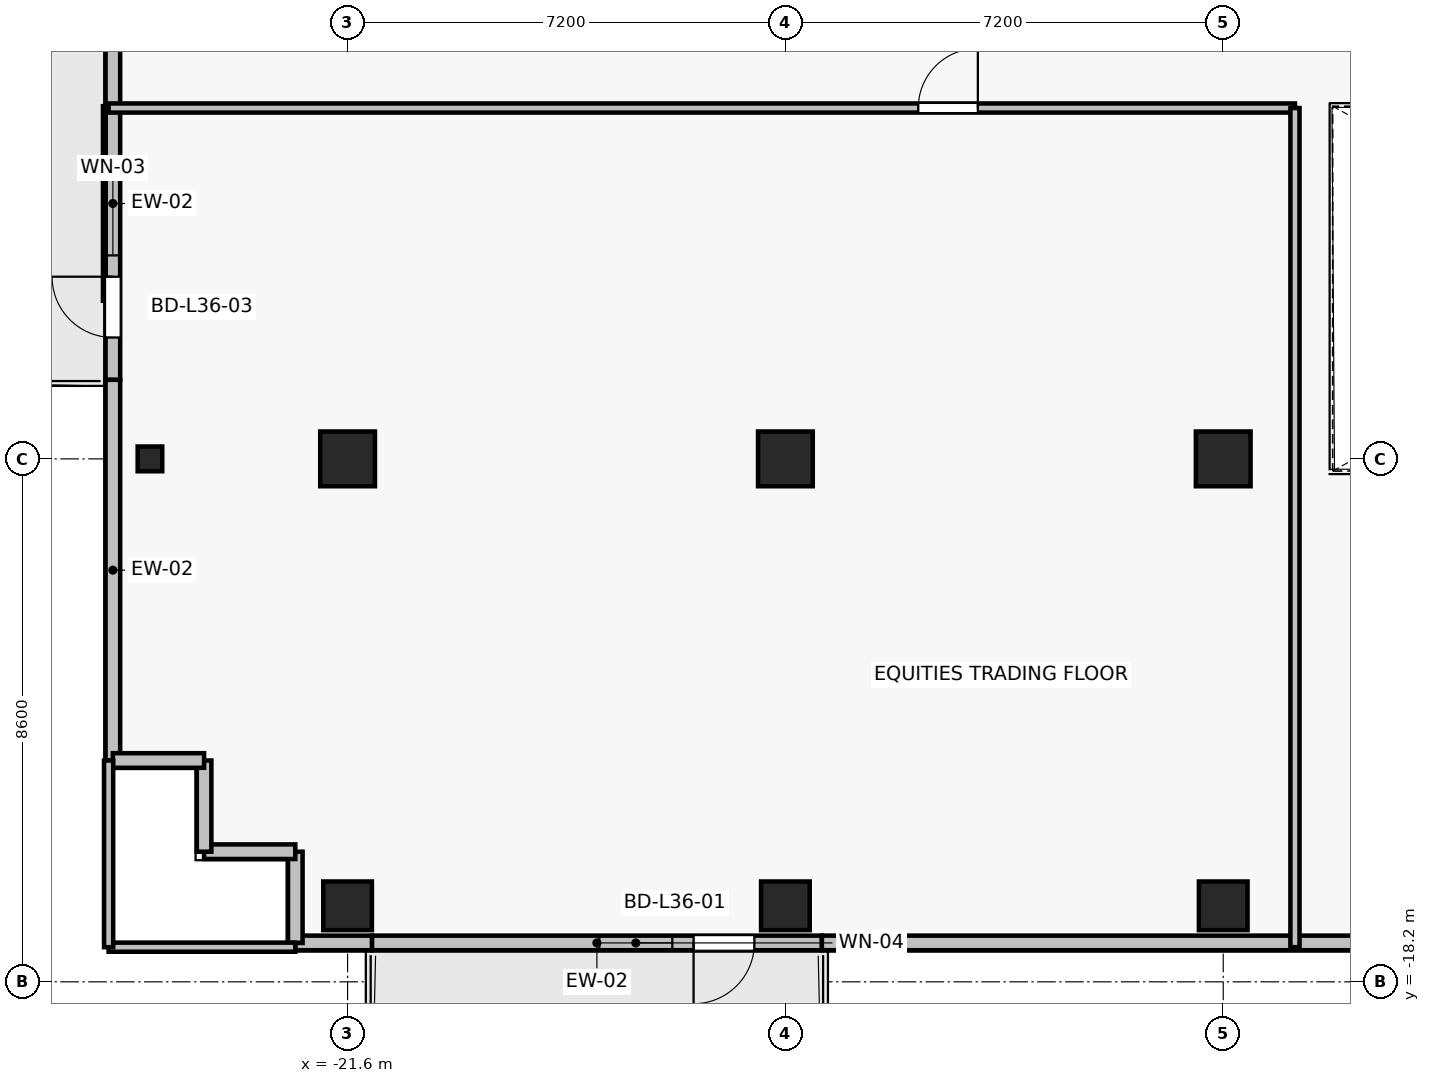
"""IFC4 building model, lengths in metres.
Left out: names, types, materials, properties, quantities, classifications, styles, units other than length and angle.
Written with IfcOpenShell. Run it as: python <this file> out.ifc"""

import sys

from ifc_helpers import new_model, si_unit, direction, frame, frame_2d, origin, origin_2d, place, context, subcontext, project, spatial, rectangle, i_section, extrude, source, transform, mapped, element, fill, save


model = new_model("IFC4")
c1 = context("Model", 3, precision=1e-05, world=origin(), true_north=direction((0.0, 1.0)))
c2 = subcontext(c1, "Body", "Model", "MODEL_VIEW")
j1 = project(units=[si_unit("LENGTHUNIT", "METRE"), si_unit("PLANEANGLEUNIT", "RADIAN")], contexts=[c1])
p1 = place(None, origin())
s1 = spatial("IfcSite", under=j1, at=p1, CompositionType="ELEMENT")
p2 = place(p1, origin())
s2 = spatial("IfcBuilding", under=s1, at=p2, CompositionType="ELEMENT")
p3 = place(p2, frame((0.0, 0.0, 129.7)))
s3 = spatial("IfcBuildingStorey", under=s2, at=p3, CompositionType="ELEMENT", Elevation=129.7)
for number, where, z_axis, x_axis in (
    (1, (-14.4, -9.6, 0.0), (0.0, 0.0, 1.0), (1.0, 0.0, 0.0)),
    (2, (-7.2, -9.6, 0.0), (0.0, 0.0, 1.0), (1.0, 0.0, 0.0)),
    (3, (-21.6, -9.6, 0.0), (0.0, 0.0, 1.0), (1.0, 0.0, 0.0)),
):
    element("IfcColumn", number, at=place(p3, frame(where, z_axis=z_axis, x_axis=x_axis)), inside=s3, PredefinedType="COLUMN", context=c2, shape_type="SweptSolid", body=[
        extrude(rectangle(XDim=0.9, YDim=0.9, at=origin_2d()), origin(), (0.0, 0.0, 1.0), 3.3),
    ])
for number, where, z_axis, x_axis in (
    (4, (-14.4, -16.95, 0.0), (0.0, 0.0, 1.0), (1.0, 0.0, 0.0)),
    (5, (-7.2, -16.95, 0.0), (0.0, 0.0, 1.0), (1.0, 0.0, 0.0)),
    (6, (-21.6, -16.95, 0.0), (0.0, 0.0, 1.0), (1.0, 0.0, 0.0)),
):
    element("IfcColumn", number, at=place(p3, frame(where, z_axis=z_axis, x_axis=x_axis)), inside=s3, PredefinedType="COLUMN", context=c2, shape_type="SweptSolid", body=[
        extrude(rectangle(XDim=0.8, YDim=0.8, at=origin_2d()), origin(), (0.0, 0.0, 1.0), 3.3),
    ])
p4 = place(p3, frame((-24.85, -9.6, 0.0), z_axis=(0.0, 0.0, 1.0), x_axis=(1.0, 0.0, 0.0)))
e7 = element("IfcColumn", 7, at=p4, inside=s3, PredefinedType="COLUMN", context=c2, shape_type="SweptSolid", body=[
    extrude(i_section(OverallWidth=0.404, OverallDepth=0.407, WebThickness=0.022, FlangeThickness=0.032, FilletRadius=0.015, at=origin_2d()), origin(), (0.0, 0.0, 1.0), 3.3),
])
p5 = place(p3, frame((-13.8, -17.56, 0.0), z_axis=(0.0, 0.0, 1.0), x_axis=(-1.0, 0.0, 0.0)))
e8 = element("IfcWall", 8, at=p5, inside=s3, PredefinedType="SOLIDWALL", context=c2, shape_type="SweptSolid", body=[
    extrude(rectangle(XDim=7.4, YDim=0.24, at=frame_2d((3.7, 0.0))), origin(), (0.0, 0.0, 1.0), 2.665),
])
p6 = place(p5, frame((1.11, 0.0, 0.0)))
e9 = element("IfcOpeningElement", 9, at=p6, cuts=e8, PredefinedType="OPENING", context=c2, shape_type="SweptSolid", body=[
    extrude(rectangle(XDim=1.0, YDim=2.2, at=frame_2d((0.5, 1.1))), frame((0.0, 0.13, 0.0), z_axis=(0.0, -1.0, 0.0), x_axis=(1.0, 0.0, 0.0)), (0.0, 0.0, 1.0), 0.26),
])
p7 = place(p5, frame((2.46, 0.0, 0.85)))
e10 = element("IfcOpeningElement", 10, at=p7, cuts=e8, PredefinedType="OPENING", context=c2, shape_type="SweptSolid", body=[
    extrude(rectangle(XDim=1.2, YDim=1.5, at=frame_2d((0.6, 0.75))), frame((0.0, 0.13, 0.0), z_axis=(0.0, -1.0, 0.0), x_axis=(1.0, 0.0, 0.0)), (0.0, 0.0, 1.0), 0.26),
])
p8 = place(p3, frame((-25.46, -8.3, 0.0), z_axis=(0.0, 0.0, 1.0), x_axis=(0.0, 1.0, 0.0)))
e11 = element("IfcWall", 11, at=p8, inside=s3, PredefinedType="SOLIDWALL", context=c2, shape_type="SweptSolid", body=[
    extrude(rectangle(XDim=5.8, YDim=0.24, at=frame_2d((2.9, 0.0))), origin(), (0.0, 0.0, 1.0), 3.075),
])
p9 = place(p8, frame((0.696, 0.0, 0.0)))
e12 = element("IfcOpeningElement", 12, at=p9, cuts=e11, PredefinedType="OPENING", context=c2, shape_type="SweptSolid", body=[
    extrude(rectangle(XDim=1.0, YDim=2.2, at=frame_2d((0.5, 1.1))), frame((0.0, 0.13, 0.0), z_axis=(0.0, -1.0, 0.0), x_axis=(1.0, 0.0, 0.0)), (0.0, 0.0, 1.0), 0.26),
])
p10 = place(p8, frame((2.046, 0.0, 0.85)))
e13 = element("IfcOpeningElement", 13, at=p10, cuts=e11, PredefinedType="OPENING", context=c2, shape_type="SweptSolid", body=[
    extrude(rectangle(XDim=1.5, YDim=1.6, at=frame_2d((0.75, 0.8))), frame((0.0, 0.13, 0.0), z_axis=(0.0, -1.0, 0.0), x_axis=(1.0, 0.0, 0.0)), (0.0, 0.0, 1.0), 0.26),
])
p11 = place(p3, frame((-25.46, -8.3, 0.0), z_axis=(0.0, 0.0, 1.0), x_axis=(0.0, -1.0, 0.0)))
e14 = element("IfcWall", 14, at=p11, inside=s3, PredefinedType="SOLIDWALL", context=c2, shape_type="SweptSolid", body=[
    extrude(rectangle(XDim=6.26, YDim=0.24, at=frame_2d((3.13, 0.0))), origin(), (0.0, 0.0, 1.0), 3.075),
])
p12 = place(p3, frame((-13.8, -17.56, 0.0), z_axis=(0.0, 0.0, 1.0), x_axis=(1.0, 0.0, 0.0)))
e15 = element("IfcWall", 15, at=p12, inside=s3, PredefinedType="SOLIDWALL", context=c2, shape_type="SweptSolid", body=[
    extrude(rectangle(XDim=10.46, YDim=0.24, at=frame_2d((5.23, 0.0))), origin(), (0.0, 0.0, 1.0), 2.665),
])
p13 = place(p3, frame((-22.46, -17.56, 0.0), z_axis=(0.0, 0.0, 1.0), x_axis=(1.0, 0.0, 0.0)))
e16 = element("IfcWall", 16, at=p13, inside=s3, PredefinedType="SOLIDWALL", context=c2, shape_type="SweptSolid", body=[
    extrude(rectangle(XDim=1.26, YDim=0.24, at=frame_2d((0.63, 0.0))), origin(), (0.0, 0.0, 1.0), 3.075),
])
p14 = place(p3, frame((-22.46, -16.06, 0.0), z_axis=(0.0, 0.0, 1.0), x_axis=(0.0, -1.0, 0.0)))
e17 = element("IfcWall", 17, at=p14, inside=s3, PredefinedType="SOLIDWALL", context=c2, shape_type="SweptSolid", body=[
    extrude(rectangle(XDim=1.5, YDim=0.24, at=frame_2d((0.75, 0.0))), origin(), (0.0, 0.0, 1.0), 2.565),
])
for number, where, z_axis, x_axis in (
    (18, (-23.96, -16.06, 0.0), (0.0, 0.0, 1.0), (1.0, 0.0, 0.0)),
    (19, (-23.96, -14.56, 0.0), (0.0, 0.0, 1.0), (0.0, -1.0, 0.0)),
    (20, (-25.46, -14.56, 0.0), (0.0, 0.0, 1.0), (1.0, 0.0, 0.0)),
):
    element("IfcWall", number, at=place(p3, frame(where, z_axis=z_axis, x_axis=x_axis)), inside=s3, PredefinedType="SOLIDWALL", context=c2, shape_type="SweptSolid", body=[
        extrude(rectangle(XDim=1.5, YDim=0.24, at=frame_2d((0.75, 0.0))), origin(), (0.0, 0.0, 1.0), 3.075),
    ])
p15 = place(p3, frame((-22.46, -17.63, 0.0), z_axis=(0.0, 0.0, 1.0), x_axis=(-1.0, 0.0, 0.0)))
e21 = element("IfcWall", 21, at=p15, inside=s3, PredefinedType="PARTITIONING", context=c2, shape_type="SweptSolid", body=[
    extrude(rectangle(XDim=3.07, YDim=0.15, at=frame_2d((1.535, 0.0))), origin(), (0.0, 0.0, 1.0), 2.665),
])
p16 = place(p3, frame((-25.53, -3.83, 0.0), z_axis=(0.0, 0.0, 1.0), x_axis=(1.0, 0.0, 0.0)))
e22 = element("IfcWall", 22, at=p16, inside=s3, PredefinedType="PARTITIONING", context=c2, shape_type="SweptSolid", body=[
    extrude(rectangle(XDim=19.51, YDim=0.15, at=frame_2d((9.755, 0.0))), origin(), (0.0, 0.0, 1.0), 2.515),
])
p17 = place(p16, frame((13.315, 0.0, 0.0)))
e23 = element("IfcOpeningElement", 23, at=p17, cuts=e22, PredefinedType="OPENING", context=c2, shape_type="SweptSolid", body=[
    extrude(rectangle(XDim=0.98, YDim=2.15, at=frame_2d((0.49, 1.075))), frame((0.0, 0.085, 0.0), z_axis=(0.0, -1.0, 0.0), x_axis=(1.0, 0.0, 0.0)), (0.0, 0.0, 1.0), 0.17),
])
p18 = place(p3, frame((-25.53, -17.63, 0.0), z_axis=(0.0, 0.0, 1.0), x_axis=(0.0, 1.0, 0.0)))
e24 = element("IfcWall", 24, at=p18, inside=s3, PredefinedType="PARTITIONING", context=c2, shape_type="SweptSolid", body=[
    extrude(rectangle(XDim=3.07, YDim=0.15, at=frame_2d((1.535, 0.0))), origin(), (0.0, 0.0, 1.0), 3.075),
])
p19 = place(p3, frame((-6.02, -3.83, 0.0), z_axis=(0.0, 0.0, 1.0), x_axis=(0.0, -1.0, 0.0)))
e25 = element("IfcWall", 25, at=p19, inside=s3, PredefinedType="PARTITIONING", context=c2, shape_type="SweptSolid", body=[
    extrude(rectangle(XDim=13.8, YDim=0.15, at=frame_2d((6.9, 0.0))), origin(), (0.0, 0.0, 1.0), 2.515),
])
m1 = source(origin(), c2, "Body", "SweptSolid", [
    extrude(rectangle(XDim=1.0, YDim=2.2, at=frame_2d((0.5, 1.1))), frame((0.0, 0.025, 0.0), z_axis=(0.0, -1.0, 0.0), x_axis=(1.0, 0.0, 0.0)), (0.0, 0.0, 1.0), 0.05),
])
p20 = place(p6, origin())
e26 = element("IfcDoor", 26, at=p20, inside=s3, OperationType="SINGLE_SWING_RIGHT", PredefinedType="DOOR", context=c2, shape_type="MappedRepresentation", body=[
    mapped(m1, transform((0.0, 0.0, 0.0), x_axis=(1.0, 0.0, 0.0), y_axis=(0.0, 1.0, 0.0), z_axis=(0.0, 0.0, 1.0), scale=1.0)),
])
fill(e9, e26)
m2 = source(origin(), c2, "Body", "SweptSolid", [
    extrude(rectangle(XDim=1.2, YDim=1.5, at=frame_2d((0.6, 0.75))), frame((0.0, 0.03, 0.0), z_axis=(0.0, -1.0, 0.0), x_axis=(1.0, 0.0, 0.0)), (0.0, 0.0, 1.0), 0.06),
])
p21 = place(p7, origin())
e27 = element("IfcWindow", 27, at=p21, inside=s3, PartitioningType="SINGLE_PANEL", PredefinedType="WINDOW", context=c2, shape_type="MappedRepresentation", body=[
    mapped(m2, transform((0.0, 0.0, 0.0), x_axis=(1.0, 0.0, 0.0), y_axis=(0.0, 1.0, 0.0), z_axis=(0.0, 0.0, 1.0), scale=1.0)),
])
fill(e10, e27)
p22 = place(p9, origin())
e28 = element("IfcDoor", 28, at=p22, inside=s3, OperationType="SINGLE_SWING_RIGHT", PredefinedType="DOOR", context=c2, shape_type="MappedRepresentation", body=[
    mapped(m1, transform((0.0, 0.0, 0.0), x_axis=(1.0, 0.0, 0.0), y_axis=(0.0, 1.0, 0.0), z_axis=(0.0, 0.0, 1.0), scale=1.0)),
])
fill(e12, e28)
m3 = source(origin(), c2, "Body", "SweptSolid", [
    extrude(rectangle(XDim=1.5, YDim=1.6, at=frame_2d((0.75, 0.8))), frame((0.0, 0.03, 0.0), z_axis=(0.0, -1.0, 0.0), x_axis=(1.0, 0.0, 0.0)), (0.0, 0.0, 1.0), 0.06),
])
p23 = place(p10, origin())
e29 = element("IfcWindow", 29, at=p23, inside=s3, PartitioningType="SINGLE_PANEL", PredefinedType="WINDOW", context=c2, shape_type="MappedRepresentation", body=[
    mapped(m3, transform((0.0, 0.0, 0.0), x_axis=(1.0, 0.0, 0.0), y_axis=(0.0, 1.0, 0.0), z_axis=(0.0, 0.0, 1.0), scale=1.0)),
])
fill(e13, e29)
m4 = source(origin(), c2, "Body", "SweptSolid", [
    extrude(rectangle(XDim=0.98, YDim=2.15, at=frame_2d((0.49, 1.075))), frame((0.0, 0.025, 0.0), z_axis=(0.0, -1.0, 0.0), x_axis=(1.0, 0.0, 0.0)), (0.0, 0.0, 1.0), 0.05),
])
p24 = place(p17, origin())
e30 = element("IfcDoor", 30, at=p24, inside=s3, OperationType="SINGLE_SWING_RIGHT", PredefinedType="DOOR", context=c2, shape_type="MappedRepresentation", body=[
    mapped(m4, transform((0.0, 0.0, 0.0), x_axis=(1.0, 0.0, 0.0), y_axis=(0.0, 1.0, 0.0), z_axis=(0.0, 0.0, 1.0), scale=1.0)),
])
fill(e23, e30)
save(model, sys.argv[1])
